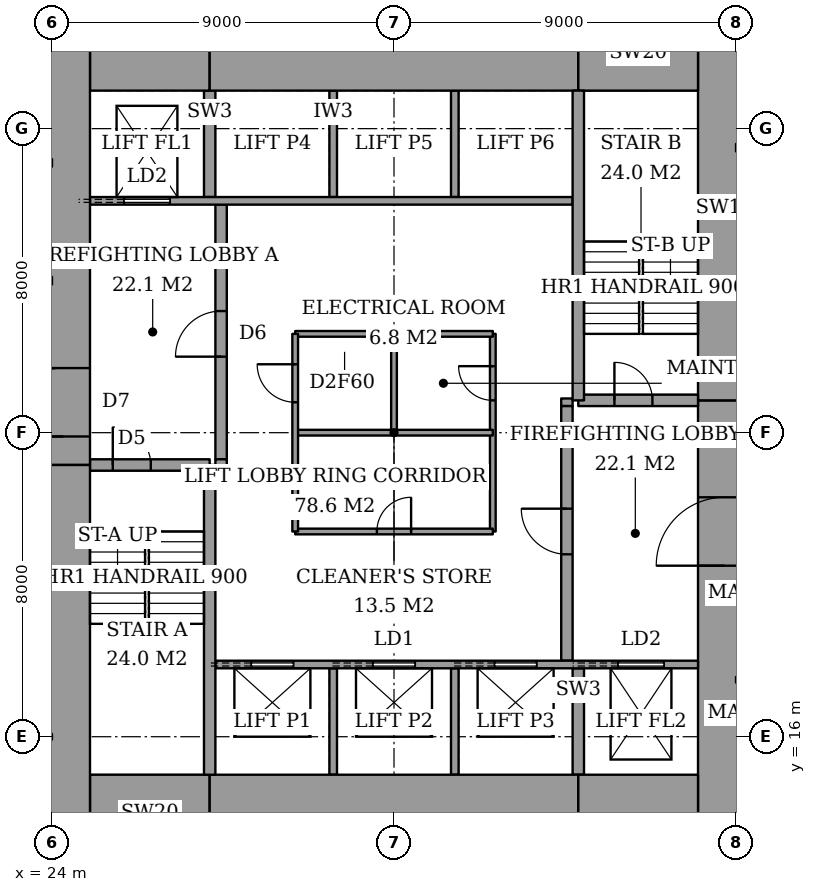
"""IFC4 building model, lengths in metres.
Left out: names, types, materials, properties, quantities, classifications, styles, units other than length and angle.
Written with IfcOpenShell. Run it as: python <this file> out.ifc"""

import sys

from ifc_helpers import new_model, si_unit, direction, frame, frame_2d, origin, place, context, subcontext, project, spatial, rectangle, extrude, element, fill, save


model = new_model("IFC4")
c1 = context("Model", 3, precision=1e-05, world=origin(), true_north=direction((0.0, 1.0)))
c2 = subcontext(c1, "Body", "Model", "MODEL_VIEW")
j1 = project(units=[si_unit("LENGTHUNIT", "METRE"), si_unit("PLANEANGLEUNIT", "RADIAN")], contexts=[c1])
p1 = place(None, origin())
s1 = spatial("IfcSite", under=j1, at=p1, CompositionType="ELEMENT")
p2 = place(p1, origin())
s2 = spatial("IfcBuilding", under=s1, at=p2, CompositionType="ELEMENT")
p3 = place(p2, frame((0.0, 0.0, 47.6)))
s3 = spatial("IfcBuildingStorey", under=s2, at=p3, CompositionType="ELEMENT", Elevation=47.6)
p4 = place(p3, frame((25.0, 14.0, 0.0), z_axis=(0.0, 0.0, 1.0), x_axis=(1.0, 0.0, 0.0)))
e1 = element("IfcWall", 1, at=p4, inside=s3, PredefinedType="SHEAR", context=c2, shape_type="SweptSolid", body=[
    extrude(rectangle(XDim=3.15, YDim=2.0, at=frame_2d((1.575, 0.0))), origin(), (0.0, 0.0, 1.0), 3.6),
])
p5 = place(p3, frame((28.15, 14.0, 0.0), z_axis=(0.0, 0.0, 1.0), x_axis=(1.0, 0.0, 0.0)))
e2 = element("IfcWall", 2, at=p5, inside=s3, PredefinedType="SHEAR", context=c2, shape_type="SweptSolid", body=[
    extrude(rectangle(XDim=9.7, YDim=2.0, at=frame_2d((4.85, 0.0))), origin(), (0.0, 0.0, 1.0), 3.6),
])
for number, where, z_axis, x_axis in (
    (3, (37.85, 14.0, 0.0), (0.0, 0.0, 1.0), (1.0, 0.0, 0.0)),
    (4, (25.0, 34.0, 0.0), (0.0, 0.0, 1.0), (1.0, 0.0, 0.0)),
):
    element("IfcWall", number, at=place(p3, frame(where, z_axis=z_axis, x_axis=x_axis)), inside=s3, PredefinedType="SHEAR", context=c2, shape_type="SweptSolid", body=[
        extrude(rectangle(XDim=3.15, YDim=2.0, at=frame_2d((1.575, 0.0))), origin(), (0.0, 0.0, 1.0), 3.6),
    ])
p6 = place(p3, frame((28.15, 34.0, 0.0), z_axis=(0.0, 0.0, 1.0), x_axis=(1.0, 0.0, 0.0)))
e5 = element("IfcWall", 5, at=p6, inside=s3, PredefinedType="SHEAR", context=c2, shape_type="SweptSolid", body=[
    extrude(rectangle(XDim=9.7, YDim=2.0, at=frame_2d((4.85, 0.0))), origin(), (0.0, 0.0, 1.0), 3.6),
])
p7 = place(p3, frame((37.85, 34.0, 0.0), z_axis=(0.0, 0.0, 1.0), x_axis=(1.0, 0.0, 0.0)))
e6 = element("IfcWall", 6, at=p7, inside=s3, PredefinedType="SHEAR", context=c2, shape_type="SweptSolid", body=[
    extrude(rectangle(XDim=3.15, YDim=2.0, at=frame_2d((1.575, 0.0))), origin(), (0.0, 0.0, 1.0), 3.6),
])
p8 = place(p3, frame((24.3, 13.0, 0.0), z_axis=(0.0, 0.0, 1.0), x_axis=(0.0, 1.0, 0.0)))
e7 = element("IfcWall", 7, at=p8, inside=s3, PredefinedType="SHEAR", context=c2, shape_type="SweptSolid", body=[
    extrude(rectangle(XDim=10.15, YDim=1.4, at=frame_2d((5.075, 0.0))), origin(), (0.0, 0.0, 1.0), 3.6),
])
p9 = place(p3, frame((24.3, 23.15, 0.0), z_axis=(0.0, 0.0, 1.0), x_axis=(0.0, 1.0, 0.0)))
e8 = element("IfcWall", 8, at=p9, inside=s3, PredefinedType="SHEAR", context=c2, shape_type="SweptSolid", body=[
    extrude(rectangle(XDim=11.85, YDim=1.4, at=frame_2d((5.925, 0.0))), origin(), (0.0, 0.0, 1.0), 3.6),
])
p10 = place(p9, frame((0.75, 0.0, 0.0)))
e9 = element("IfcOpeningElement", 9, at=p10, cuts=e8, PredefinedType="OPENING", context=c2, shape_type="SweptSolid", body=[
    extrude(rectangle(XDim=1.8, YDim=2.4, at=frame_2d((0.9, 1.2))), frame((0.0, 0.71, 0.0), z_axis=(0.0, -1.0, 0.0), x_axis=(1.0, 0.0, 0.0)), (0.0, 0.0, 1.0), 1.42),
])
p11 = place(p3, frame((41.7, 13.0, 0.0), z_axis=(0.0, 0.0, 1.0), x_axis=(0.0, 1.0, 0.0)))
e10 = element("IfcWall", 10, at=p11, inside=s3, PredefinedType="SHEAR", context=c2, shape_type="SweptSolid", body=[
    extrude(rectangle(XDim=11.85, YDim=1.4, at=frame_2d((5.925, 0.0))), origin(), (0.0, 0.0, 1.0), 3.6),
])
p12 = place(p11, frame((7.5, 0.0, 0.0)))
e11 = element("IfcOpeningElement", 11, at=p12, cuts=e10, PredefinedType="OPENING", context=c2, shape_type="SweptSolid", body=[
    extrude(rectangle(XDim=1.8, YDim=2.4, at=frame_2d((0.9, 1.2))), frame((0.0, 0.71, 0.0), z_axis=(0.0, -1.0, 0.0), x_axis=(1.0, 0.0, 0.0)), (0.0, 0.0, 1.0), 1.42),
])
p13 = place(p3, frame((41.7, 24.85, 0.0), z_axis=(0.0, 0.0, 1.0), x_axis=(0.0, 1.0, 0.0)))
e12 = element("IfcWall", 12, at=p13, inside=s3, PredefinedType="SHEAR", context=c2, shape_type="SweptSolid", body=[
    extrude(rectangle(XDim=10.15, YDim=1.4, at=frame_2d((5.075, 0.0))), origin(), (0.0, 0.0, 1.0), 3.6),
])
p14 = place(p3, frame((28.15, 15.0, 0.0), z_axis=(0.0, 0.0, 1.0), x_axis=(0.0, 1.0, 0.0)))
e13 = element("IfcWall", 13, at=p14, inside=s3, PredefinedType="SHEAR", context=c2, shape_type="SweptSolid", body=[
    extrude(rectangle(XDim=8.15, YDim=0.3, at=frame_2d((4.075, 0.0))), origin(), (0.0, 0.0, 1.0), 3.6),
])
p15 = place(p3, frame((25.0, 23.15, 0.0), z_axis=(0.0, 0.0, 1.0), x_axis=(1.0, 0.0, 0.0)))
e14 = element("IfcWall", 14, at=p15, inside=s3, PredefinedType="SHEAR", context=c2, shape_type="SweptSolid", body=[
    extrude(rectangle(XDim=3.15, YDim=0.3, at=frame_2d((1.575, 0.0))), origin(), (0.0, 0.0, 1.0), 3.6),
])
p16 = place(p15, frame((0.6, 0.0, 0.0)))
e15 = element("IfcOpeningElement", 15, at=p16, cuts=e14, PredefinedType="OPENING", context=c2, shape_type="SweptSolid", body=[
    extrude(rectangle(XDim=1.0, YDim=2.1, at=frame_2d((0.5, 1.05))), frame((0.0, 0.16, 0.0), z_axis=(0.0, -1.0, 0.0), x_axis=(1.0, 0.0, 0.0)), (0.0, 0.0, 1.0), 0.32),
])
p17 = place(p3, frame((37.85, 24.85, 0.0), z_axis=(0.0, 0.0, 1.0), x_axis=(0.0, 1.0, 0.0)))
e16 = element("IfcWall", 16, at=p17, inside=s3, PredefinedType="SHEAR", context=c2, shape_type="SweptSolid", body=[
    extrude(rectangle(XDim=8.15, YDim=0.3, at=frame_2d((4.075, 0.0))), origin(), (0.0, 0.0, 1.0), 3.6),
])
p18 = place(p3, frame((37.85, 24.85, 0.0), z_axis=(0.0, 0.0, 1.0), x_axis=(1.0, 0.0, 0.0)))
e17 = element("IfcWall", 17, at=p18, inside=s3, PredefinedType="SHEAR", context=c2, shape_type="SweptSolid", body=[
    extrude(rectangle(XDim=3.15, YDim=0.3, at=frame_2d((1.575, 0.0))), origin(), (0.0, 0.0, 1.0), 3.6),
])
p19 = place(p18, frame((0.95, 0.0, 0.0)))
e18 = element("IfcOpeningElement", 18, at=p19, cuts=e17, PredefinedType="OPENING", context=c2, shape_type="SweptSolid", body=[
    extrude(rectangle(XDim=1.0, YDim=2.1, at=frame_2d((0.5, 1.05))), frame((0.0, 0.16, 0.0), z_axis=(0.0, -1.0, 0.0), x_axis=(1.0, 0.0, 0.0)), (0.0, 0.0, 1.0), 0.32),
])
p20 = place(p3, frame((28.45, 23.3, 0.0), z_axis=(0.0, 0.0, 1.0), x_axis=(0.0, 1.0, 0.0)))
e19 = element("IfcWall", 19, at=p20, inside=s3, PredefinedType="PARTITIONING", context=c2, shape_type="SweptSolid", body=[
    extrude(rectangle(XDim=6.7, YDim=0.3, at=frame_2d((3.35, 0.0))), origin(), (0.0, 0.0, 1.0), 3.6),
])
p21 = place(p20, frame((2.7, 0.0, 0.0)))
e20 = element("IfcOpeningElement", 20, at=p21, cuts=e19, PredefinedType="OPENING", context=c2, shape_type="SweptSolid", body=[
    extrude(rectangle(XDim=1.2, YDim=2.1, at=frame_2d((0.6, 1.05))), frame((0.0, 0.16, 0.0), z_axis=(0.0, -1.0, 0.0), x_axis=(1.0, 0.0, 0.0)), (0.0, 0.0, 1.0), 0.32),
])
p22 = place(p3, frame((37.55, 18.0, 0.0), z_axis=(0.0, 0.0, 1.0), x_axis=(0.0, 1.0, 0.0)))
e21 = element("IfcWall", 21, at=p22, inside=s3, PredefinedType="PARTITIONING", context=c2, shape_type="SweptSolid", body=[
    extrude(rectangle(XDim=6.7, YDim=0.3, at=frame_2d((3.35, 0.0))), origin(), (0.0, 0.0, 1.0), 3.6),
])
p23 = place(p22, frame((2.8, 0.0, 0.0)))
e22 = element("IfcOpeningElement", 22, at=p23, cuts=e21, PredefinedType="OPENING", context=c2, shape_type="SweptSolid", body=[
    extrude(rectangle(XDim=1.2, YDim=2.1, at=frame_2d((0.6, 1.05))), frame((0.0, 0.16, 0.0), z_axis=(0.0, -1.0, 0.0), x_axis=(1.0, 0.0, 0.0)), (0.0, 0.0, 1.0), 0.32),
])
p24 = place(p3, frame((28.3, 17.9, 0.0), z_axis=(0.0, 0.0, 1.0), x_axis=(1.0, 0.0, 0.0)))
e23 = element("IfcWall", 23, at=p24, inside=s3, PredefinedType="PARTITIONING", context=c2, shape_type="SweptSolid", body=[
    extrude(rectangle(XDim=12.7, YDim=0.2, at=frame_2d((6.35, 0.0))), origin(), (0.0, 0.0, 1.0), 3.6),
])
p25 = place(p24, frame((0.95, 0.0, 0.0)))
e24 = element("IfcOpeningElement", 24, at=p25, cuts=e23, PredefinedType="OPENING", context=c2, shape_type="SweptSolid", body=[
    extrude(rectangle(XDim=1.1, YDim=2.1, at=frame_2d((0.55, 1.05))), frame((0.0, 0.11, 0.0), z_axis=(0.0, -1.0, 0.0), x_axis=(1.0, 0.0, 0.0)), (0.0, 0.0, 1.0), 0.22),
])
p26 = place(p24, frame((4.15, 0.0, 0.0)))
e25 = element("IfcOpeningElement", 25, at=p26, cuts=e23, PredefinedType="OPENING", context=c2, shape_type="SweptSolid", body=[
    extrude(rectangle(XDim=1.1, YDim=2.1, at=frame_2d((0.55, 1.05))), frame((0.0, 0.11, 0.0), z_axis=(0.0, -1.0, 0.0), x_axis=(1.0, 0.0, 0.0)), (0.0, 0.0, 1.0), 0.22),
])
p27 = place(p24, frame((7.35, 0.0, 0.0)))
e26 = element("IfcOpeningElement", 26, at=p27, cuts=e23, PredefinedType="OPENING", context=c2, shape_type="SweptSolid", body=[
    extrude(rectangle(XDim=1.1, YDim=2.1, at=frame_2d((0.55, 1.05))), frame((0.0, 0.11, 0.0), z_axis=(0.0, -1.0, 0.0), x_axis=(1.0, 0.0, 0.0)), (0.0, 0.0, 1.0), 0.22),
])
p28 = place(p24, frame((10.6, 0.0, 0.0)))
e27 = element("IfcOpeningElement", 27, at=p28, cuts=e23, PredefinedType="OPENING", context=c2, shape_type="SweptSolid", body=[
    extrude(rectangle(XDim=1.2, YDim=2.1, at=frame_2d((0.6, 1.05))), frame((0.0, 0.11, 0.0), z_axis=(0.0, -1.0, 0.0), x_axis=(1.0, 0.0, 0.0)), (0.0, 0.0, 1.0), 0.22),
])
p29 = place(p3, frame((25.0, 30.1, 0.0), z_axis=(0.0, 0.0, 1.0), x_axis=(1.0, 0.0, 0.0)))
e28 = element("IfcWall", 28, at=p29, inside=s3, PredefinedType="PARTITIONING", context=c2, shape_type="SweptSolid", body=[
    extrude(rectangle(XDim=12.7, YDim=0.2, at=frame_2d((6.35, 0.0))), origin(), (0.0, 0.0, 1.0), 3.6),
])
p30 = place(p29, frame((0.9, 0.0, 0.0)))
e29 = element("IfcOpeningElement", 29, at=p30, cuts=e28, PredefinedType="OPENING", context=c2, shape_type="SweptSolid", body=[
    extrude(rectangle(XDim=1.2, YDim=2.1, at=frame_2d((0.6, 1.05))), frame((0.0, 0.11, 0.0), z_axis=(0.0, -1.0, 0.0), x_axis=(1.0, 0.0, 0.0)), (0.0, 0.0, 1.0), 0.22),
])
for number, where, z_axis, x_axis in (
    (30, (31.4, 15.0, 0.0), (0.0, 0.0, 1.0), (0.0, 1.0, 0.0)),
    (31, (34.6, 15.0, 0.0), (0.0, 0.0, 1.0), (0.0, 1.0, 0.0)),
):
    element("IfcWall", number, at=place(p3, frame(where, z_axis=z_axis, x_axis=x_axis)), inside=s3, PredefinedType="PARTITIONING", context=c2, shape_type="SweptSolid", body=[
        extrude(rectangle(XDim=2.8, YDim=0.2, at=frame_2d((1.4, 0.0))), origin(), (0.0, 0.0, 1.0), 3.6),
    ])
p31 = place(p3, frame((37.85, 15.0, 0.0), z_axis=(0.0, 0.0, 1.0), x_axis=(0.0, 1.0, 0.0)))
e32 = element("IfcWall", 32, at=p31, inside=s3, PredefinedType="SHEAR", context=c2, shape_type="SweptSolid", body=[
    extrude(rectangle(XDim=2.8, YDim=0.3, at=frame_2d((1.4, 0.0))), origin(), (0.0, 0.0, 1.0), 3.6),
])
for number, where, z_axis, x_axis in (
    (33, (31.4, 30.2, 0.0), (0.0, 0.0, 1.0), (0.0, 1.0, 0.0)),
    (34, (34.6, 30.2, 0.0), (0.0, 0.0, 1.0), (0.0, 1.0, 0.0)),
):
    element("IfcWall", number, at=place(p3, frame(where, z_axis=z_axis, x_axis=x_axis)), inside=s3, PredefinedType="PARTITIONING", context=c2, shape_type="SweptSolid", body=[
        extrude(rectangle(XDim=2.8, YDim=0.2, at=frame_2d((1.4, 0.0))), origin(), (0.0, 0.0, 1.0), 3.6),
    ])
p32 = place(p3, frame((28.15, 30.2, 0.0), z_axis=(0.0, 0.0, 1.0), x_axis=(0.0, 1.0, 0.0)))
e35 = element("IfcWall", 35, at=p32, inside=s3, PredefinedType="SHEAR", context=c2, shape_type="SweptSolid", body=[
    extrude(rectangle(XDim=2.8, YDim=0.3, at=frame_2d((1.4, 0.0))), origin(), (0.0, 0.0, 1.0), 3.6),
])
for number, where, z_axis, x_axis in (
    (36, (28.3, 23.2, 0.0), (0.0, 0.0, 1.0), (1.0, 0.0, 0.0)),
    (37, (37.4, 24.8, 0.0), (0.0, 0.0, 1.0), (1.0, 0.0, 0.0)),
):
    element("IfcWall", number, at=place(p3, frame(where, z_axis=z_axis, x_axis=x_axis)), inside=s3, PredefinedType="PARTITIONING", context=c2, shape_type="SweptSolid", body=[
        extrude(rectangle(XDim=0.3, YDim=0.2, at=frame_2d((0.15, 0.0))), origin(), (0.0, 0.0, 1.0), 3.6),
    ])
p33 = place(p3, frame((30.4, 21.4, 0.0), z_axis=(0.0, 0.0, 1.0), x_axis=(1.0, 0.0, 0.0)))
e38 = element("IfcWall", 38, at=p33, inside=s3, PredefinedType="PARTITIONING", context=c2, shape_type="SweptSolid", body=[
    extrude(rectangle(XDim=5.2, YDim=0.15, at=frame_2d((2.6, 0.0))), origin(), (0.0, 0.0, 1.0), 3.35),
])
p34 = place(p33, frame((2.15, 0.0, 0.0)))
e39 = element("IfcOpeningElement", 39, at=p34, cuts=e38, PredefinedType="OPENING", context=c2, shape_type="SweptSolid", body=[
    extrude(rectangle(XDim=0.9, YDim=2.1, at=frame_2d((0.45, 1.05))), frame((0.0, 0.085, 0.0), z_axis=(0.0, -1.0, 0.0), x_axis=(1.0, 0.0, 0.0)), (0.0, 0.0, 1.0), 0.17),
])
p35 = place(p3, frame((30.4, 26.6, 0.0), z_axis=(0.0, 0.0, 1.0), x_axis=(1.0, 0.0, 0.0)))
e40 = element("IfcWall", 40, at=p35, inside=s3, PredefinedType="PARTITIONING", context=c2, shape_type="SweptSolid", body=[
    extrude(rectangle(XDim=5.2, YDim=0.15, at=frame_2d((2.6, 0.0))), origin(), (0.0, 0.0, 1.0), 3.35),
])
p36 = place(p3, frame((30.4, 21.4, 0.0), z_axis=(0.0, 0.0, 1.0), x_axis=(0.0, 1.0, 0.0)))
e41 = element("IfcWall", 41, at=p36, inside=s3, PredefinedType="PARTITIONING", context=c2, shape_type="SweptSolid", body=[
    extrude(rectangle(XDim=5.2, YDim=0.15, at=frame_2d((2.6, 0.0))), origin(), (0.0, 0.0, 1.0), 3.35),
])
p37 = place(p36, frame((3.4, 0.0, 0.0)))
e42 = element("IfcOpeningElement", 42, at=p37, cuts=e41, PredefinedType="OPENING", context=c2, shape_type="SweptSolid", body=[
    extrude(rectangle(XDim=1.0, YDim=2.1, at=frame_2d((0.5, 1.05))), frame((0.0, 0.085, 0.0), z_axis=(0.0, -1.0, 0.0), x_axis=(1.0, 0.0, 0.0)), (0.0, 0.0, 1.0), 0.17),
])
p38 = place(p3, frame((35.6, 21.4, 0.0), z_axis=(0.0, 0.0, 1.0), x_axis=(0.0, 1.0, 0.0)))
e43 = element("IfcWall", 43, at=p38, inside=s3, PredefinedType="PARTITIONING", context=c2, shape_type="SweptSolid", body=[
    extrude(rectangle(XDim=5.2, YDim=0.15, at=frame_2d((2.6, 0.0))), origin(), (0.0, 0.0, 1.0), 3.35),
])
p39 = place(p38, frame((3.45, 0.0, 0.0)))
e44 = element("IfcOpeningElement", 44, at=p39, cuts=e43, PredefinedType="OPENING", context=c2, shape_type="SweptSolid", body=[
    extrude(rectangle(XDim=0.9, YDim=2.1, at=frame_2d((0.45, 1.05))), frame((0.0, 0.085, 0.0), z_axis=(0.0, -1.0, 0.0), x_axis=(1.0, 0.0, 0.0)), (0.0, 0.0, 1.0), 0.17),
])
p40 = place(p3, frame((30.4, 24.0, 0.0), z_axis=(0.0, 0.0, 1.0), x_axis=(1.0, 0.0, 0.0)))
e45 = element("IfcWall", 45, at=p40, inside=s3, PredefinedType="PARTITIONING", context=c2, shape_type="SweptSolid", body=[
    extrude(rectangle(XDim=5.2, YDim=0.15, at=frame_2d((2.6, 0.0))), origin(), (0.0, 0.0, 1.0), 3.35),
])
p41 = place(p3, frame((33.0, 24.0, 0.0), z_axis=(0.0, 0.0, 1.0), x_axis=(0.0, 1.0, 0.0)))
e46 = element("IfcWall", 46, at=p41, inside=s3, PredefinedType="PARTITIONING", context=c2, shape_type="SweptSolid", body=[
    extrude(rectangle(XDim=2.6, YDim=0.15, at=frame_2d((1.3, 0.0))), origin(), (0.0, 0.0, 1.0), 3.35),
])
p42 = place(p16, origin())
e47 = element("IfcDoor", 47, at=p42, inside=s3, OperationType="SINGLE_SWING_RIGHT", PredefinedType="DOOR", context=c2, shape_type="SweptSolid", body=[
    extrude(rectangle(XDim=1.0, YDim=2.1, at=frame_2d((0.5, 1.05))), frame((0.0, 0.025, 0.0), z_axis=(0.0, -1.0, 0.0), x_axis=(1.0, 0.0, 0.0)), (0.0, 0.0, 1.0), 0.05),
])
fill(e15, e47)
p43 = place(p19, origin())
e48 = element("IfcDoor", 48, at=p43, inside=s3, OperationType="SINGLE_SWING_RIGHT", PredefinedType="DOOR", context=c2, shape_type="SweptSolid", body=[
    extrude(rectangle(XDim=1.0, YDim=2.1, at=frame_2d((0.5, 1.05))), frame((0.0, 0.025, 0.0), z_axis=(0.0, -1.0, 0.0), x_axis=(1.0, 0.0, 0.0)), (0.0, 0.0, 1.0), 0.05),
])
fill(e18, e48)
p44 = place(p21, origin())
e49 = element("IfcDoor", 49, at=p44, inside=s3, OperationType="SINGLE_SWING_RIGHT", PredefinedType="DOOR", context=c2, shape_type="SweptSolid", body=[
    extrude(rectangle(XDim=1.2, YDim=2.1, at=frame_2d((0.6, 1.05))), frame((0.0, 0.025, 0.0), z_axis=(0.0, -1.0, 0.0), x_axis=(1.0, 0.0, 0.0)), (0.0, 0.0, 1.0), 0.05),
])
fill(e20, e49)
p45 = place(p23, origin())
e50 = element("IfcDoor", 50, at=p45, inside=s3, OperationType="SINGLE_SWING_LEFT", PredefinedType="DOOR", context=c2, shape_type="SweptSolid", body=[
    extrude(rectangle(XDim=1.2, YDim=2.1, at=frame_2d((0.6, 1.05))), frame((0.0, 0.025, 0.0), z_axis=(0.0, -1.0, 0.0), x_axis=(1.0, 0.0, 0.0)), (0.0, 0.0, 1.0), 0.05),
])
fill(e22, e50)
p46 = place(p10, origin())
e51 = element("IfcDoor", 51, at=p46, inside=s3, OperationType="DOUBLE_DOOR_DOUBLE_SWING", PredefinedType="DOOR", context=c2, shape_type="SweptSolid", body=[
    extrude(rectangle(XDim=1.8, YDim=2.4, at=frame_2d((0.9, 1.2))), frame((0.0, 0.025, 0.0), z_axis=(0.0, -1.0, 0.0), x_axis=(1.0, 0.0, 0.0)), (0.0, 0.0, 1.0), 0.05),
])
fill(e9, e51)
p47 = place(p12, origin())
e52 = element("IfcDoor", 52, at=p47, inside=s3, OperationType="DOUBLE_DOOR_DOUBLE_SWING", PredefinedType="DOOR", context=c2, shape_type="SweptSolid", body=[
    extrude(rectangle(XDim=1.8, YDim=2.4, at=frame_2d((0.9, 1.2))), frame((0.0, 0.025, 0.0), z_axis=(0.0, -1.0, 0.0), x_axis=(1.0, 0.0, 0.0)), (0.0, 0.0, 1.0), 0.05),
])
fill(e11, e52)
p48 = place(p34, origin())
e53 = element("IfcDoor", 53, at=p48, inside=s3, OperationType="SINGLE_SWING_LEFT", PredefinedType="DOOR", context=c2, shape_type="SweptSolid", body=[
    extrude(rectangle(XDim=0.9, YDim=2.1, at=frame_2d((0.45, 1.05))), frame((0.0, 0.025, 0.0), z_axis=(0.0, -1.0, 0.0), x_axis=(1.0, 0.0, 0.0)), (0.0, 0.0, 1.0), 0.05),
])
fill(e39, e53)
p49 = place(p37, origin())
e54 = element("IfcDoor", 54, at=p49, inside=s3, OperationType="SINGLE_SWING_LEFT", PredefinedType="DOOR", context=c2, shape_type="SweptSolid", body=[
    extrude(rectangle(XDim=1.0, YDim=2.1, at=frame_2d((0.5, 1.05))), frame((0.0, 0.025, 0.0), z_axis=(0.0, -1.0, 0.0), x_axis=(1.0, 0.0, 0.0)), (0.0, 0.0, 1.0), 0.05),
])
fill(e42, e54)
p50 = place(p39, origin())
e55 = element("IfcDoor", 55, at=p50, inside=s3, OperationType="SINGLE_SWING_LEFT", PredefinedType="DOOR", context=c2, shape_type="SweptSolid", body=[
    extrude(rectangle(XDim=0.9, YDim=2.1, at=frame_2d((0.45, 1.05))), frame((0.0, 0.025, 0.0), z_axis=(0.0, -1.0, 0.0), x_axis=(1.0, 0.0, 0.0)), (0.0, 0.0, 1.0), 0.05),
])
fill(e44, e55)
p51 = place(p25, origin())
e56 = element("IfcDoor", 56, at=p51, inside=s3, OperationType="SLIDING_TO_LEFT", PredefinedType="DOOR", context=c2, shape_type="SweptSolid", body=[
    extrude(rectangle(XDim=1.1, YDim=2.1, at=frame_2d((0.55, 1.05))), frame((0.0, 0.025, 0.0), z_axis=(0.0, -1.0, 0.0), x_axis=(1.0, 0.0, 0.0)), (0.0, 0.0, 1.0), 0.05),
])
fill(e24, e56)
p52 = place(p26, origin())
e57 = element("IfcDoor", 57, at=p52, inside=s3, OperationType="SLIDING_TO_LEFT", PredefinedType="DOOR", context=c2, shape_type="SweptSolid", body=[
    extrude(rectangle(XDim=1.1, YDim=2.1, at=frame_2d((0.55, 1.05))), frame((0.0, 0.025, 0.0), z_axis=(0.0, -1.0, 0.0), x_axis=(1.0, 0.0, 0.0)), (0.0, 0.0, 1.0), 0.05),
])
fill(e25, e57)
p53 = place(p27, origin())
e58 = element("IfcDoor", 58, at=p53, inside=s3, OperationType="SLIDING_TO_LEFT", PredefinedType="DOOR", context=c2, shape_type="SweptSolid", body=[
    extrude(rectangle(XDim=1.1, YDim=2.1, at=frame_2d((0.55, 1.05))), frame((0.0, 0.025, 0.0), z_axis=(0.0, -1.0, 0.0), x_axis=(1.0, 0.0, 0.0)), (0.0, 0.0, 1.0), 0.05),
])
fill(e26, e58)
p54 = place(p30, origin())
e59 = element("IfcDoor", 59, at=p54, inside=s3, OperationType="SLIDING_TO_LEFT", PredefinedType="DOOR", context=c2, shape_type="SweptSolid", body=[
    extrude(rectangle(XDim=1.2, YDim=2.1, at=frame_2d((0.6, 1.05))), frame((0.0, 0.025, 0.0), z_axis=(0.0, -1.0, 0.0), x_axis=(1.0, 0.0, 0.0)), (0.0, 0.0, 1.0), 0.05),
])
fill(e29, e59)
p55 = place(p28, origin())
e60 = element("IfcDoor", 60, at=p55, inside=s3, OperationType="SLIDING_TO_LEFT", PredefinedType="DOOR", context=c2, shape_type="SweptSolid", body=[
    extrude(rectangle(XDim=1.2, YDim=2.1, at=frame_2d((0.6, 1.05))), frame((0.0, 0.025, 0.0), z_axis=(0.0, -1.0, 0.0), x_axis=(1.0, 0.0, 0.0)), (0.0, 0.0, 1.0), 0.05),
])
fill(e27, e60)
save(model, sys.argv[1])
